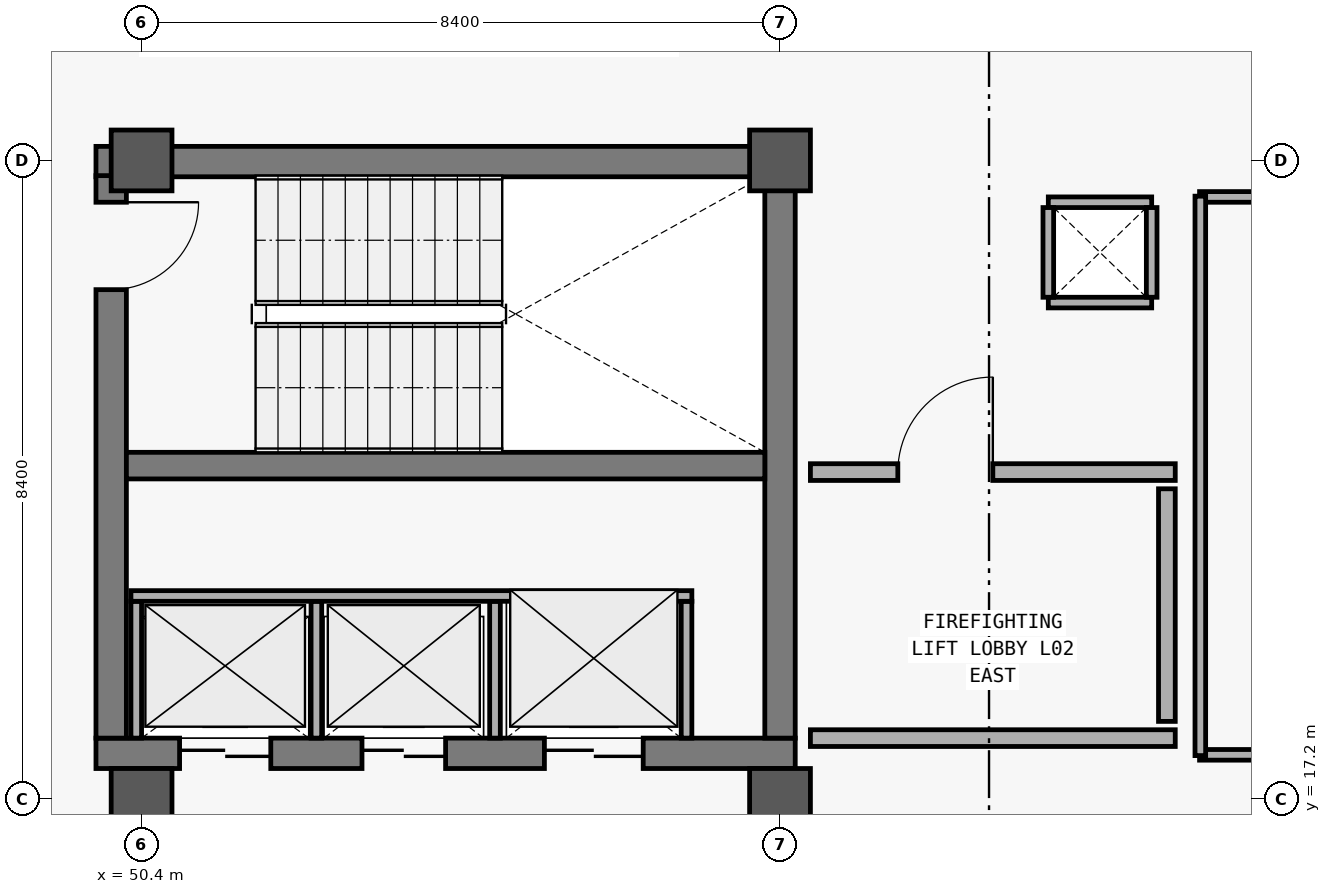
"""IFC4 building model, lengths in metres.
Left out: names, types, materials, properties, quantities, classifications, styles, units other than length and angle.
Written with IfcOpenShell. Run it as: python <this file> out.ifc"""

import sys

from ifc_helpers import new_model, si_unit, direction, frame, frame_2d, origin, origin_2d, place, context, subcontext, project, spatial, rectangle, extrude, element, fill, save


model = new_model("IFC4")
c1 = context("Model", 3, precision=1e-05, world=origin(), true_north=direction((0.0, 1.0)))
c2 = subcontext(c1, "Body", "Model", "MODEL_VIEW")
j1 = project(units=[si_unit("LENGTHUNIT", "METRE"), si_unit("PLANEANGLEUNIT", "RADIAN")], contexts=[c1])
p1 = place(None, origin())
s1 = spatial("IfcSite", under=j1, at=p1, CompositionType="ELEMENT")
p2 = place(p1, origin())
s2 = spatial("IfcBuilding", under=s1, at=p2, CompositionType="ELEMENT")
p3 = place(p2, frame((0.0, 0.0, 10.8)))
s3 = spatial("IfcBuildingStorey", under=s2, at=p3, CompositionType="ELEMENT", Elevation=10.8)
for number, where, z_axis, x_axis in (
    (1, (50.4, 17.2, 0.0), (0.0, 0.0, 1.0), (1.0, 0.0, 0.0)),
    (2, (50.4, 25.6, 0.0), (0.0, 0.0, 1.0), (1.0, 0.0, 0.0)),
    (3, (58.8, 17.2, 0.0), (0.0, 0.0, 1.0), (1.0, 0.0, 0.0)),
    (4, (58.8, 25.6, 0.0), (0.0, 0.0, 1.0), (1.0, 0.0, 0.0)),
):
    element("IfcColumn", number, at=place(p3, frame(where, z_axis=z_axis, x_axis=x_axis)), inside=s3, PredefinedType="COLUMN", context=c2, shape_type="SweptSolid", body=[
        extrude(rectangle(XDim=0.8, YDim=0.8, at=origin_2d()), origin(), (0.0, 0.0, 1.0), 4.2),
    ])
p4 = place(p3, frame((49.8, 17.8, 0.0), z_axis=(0.0, 0.0, 1.0), x_axis=(1.0, 0.0, 0.0)))
e5 = element("IfcWall", 5, at=p4, inside=s3, PredefinedType="SHEAR", context=c2, shape_type="SweptSolid", body=[
    extrude(rectangle(XDim=9.2, YDim=0.4, at=frame_2d((4.6, 0.0))), origin(), (0.0, 0.0, 1.0), 3.92),
])
p5 = place(p4, frame((1.1, 0.0, 0.0)))
e6 = element("IfcOpeningElement", 6, at=p5, cuts=e5, PredefinedType="OPENING", context=c2, shape_type="SweptSolid", body=[
    extrude(rectangle(XDim=1.2, YDim=2.2, at=frame_2d((0.6, 1.1))), frame((0.0, 0.21, 0.0), z_axis=(0.0, -1.0, 0.0), x_axis=(1.0, 0.0, 0.0)), (0.0, 0.0, 1.0), 0.42),
])
p6 = place(p4, frame((3.5, 0.0, 0.0)))
e7 = element("IfcOpeningElement", 7, at=p6, cuts=e5, PredefinedType="OPENING", context=c2, shape_type="SweptSolid", body=[
    extrude(rectangle(XDim=1.1, YDim=2.2, at=frame_2d((0.55, 1.1))), frame((0.0, 0.21, 0.0), z_axis=(0.0, -1.0, 0.0), x_axis=(1.0, 0.0, 0.0)), (0.0, 0.0, 1.0), 0.42),
])
p7 = place(p4, frame((5.9, 0.0, 0.0)))
e8 = element("IfcOpeningElement", 8, at=p7, cuts=e5, PredefinedType="OPENING", context=c2, shape_type="SweptSolid", body=[
    extrude(rectangle(XDim=1.3, YDim=2.3, at=frame_2d((0.65, 1.15))), frame((0.0, 0.21, 0.0), z_axis=(0.0, -1.0, 0.0), x_axis=(1.0, 0.0, 0.0)), (0.0, 0.0, 1.0), 0.42),
])
p8 = place(p3, frame((59.0, 25.585, 0.0), z_axis=(0.0, 0.0, 1.0), x_axis=(-1.0, 0.0, 0.0)))
e9 = element("IfcWall", 9, at=p8, inside=s3, PredefinedType="SHEAR", context=c2, shape_type="SweptSolid", body=[
    extrude(rectangle(XDim=9.2, YDim=0.4, at=frame_2d((4.6, 0.0))), origin(), (0.0, 0.0, 1.0), 3.92),
])
p9 = place(p3, frame((50.0, 25.4, 0.0), z_axis=(0.0, 0.0, 1.0), x_axis=(0.0, -1.0, 0.0)))
e10 = element("IfcWall", 10, at=p9, inside=s3, PredefinedType="SHEAR", context=c2, shape_type="SweptSolid", body=[
    extrude(rectangle(XDim=7.4, YDim=0.4, at=frame_2d((3.7, 0.0))), origin(), (0.0, 0.0, 1.0), 3.92),
])
p10 = place(p9, frame((0.35, 0.0, 0.0)))
e11 = element("IfcOpeningElement", 11, at=p10, cuts=e10, PredefinedType="OPENING", context=c2, shape_type="SweptSolid", body=[
    extrude(rectangle(XDim=1.15, YDim=2.2, at=frame_2d((0.575, 1.1))), frame((0.0, 0.21, 0.0), z_axis=(0.0, -1.0, 0.0), x_axis=(1.0, 0.0, 0.0)), (0.0, 0.0, 1.0), 0.42),
])
p11 = place(p3, frame((58.8, 18.0, 0.0), z_axis=(0.0, 0.0, 1.0), x_axis=(0.0, 1.0, 0.0)))
e12 = element("IfcWall", 12, at=p11, inside=s3, PredefinedType="SHEAR", context=c2, shape_type="SweptSolid", body=[
    extrude(rectangle(XDim=7.4, YDim=0.4, at=frame_2d((3.7, 0.0))), origin(), (0.0, 0.0, 1.0), 3.92),
])
p12 = place(p3, frame((50.2, 21.585, 0.0), z_axis=(0.0, 0.0, 1.0), x_axis=(1.0, 0.0, 0.0)))
e13 = element("IfcWall", 13, at=p12, inside=s3, PredefinedType="SHEAR", context=c2, shape_type="SweptSolid", body=[
    extrude(rectangle(XDim=8.4, YDim=0.35, at=frame_2d((4.2, 0.0))), origin(), (0.0, 0.0, 1.0), 3.92),
])
for number, where, z_axis, x_axis in (
    (14, (50.33, 18.0, 0.0), (0.0, 0.0, 1.0), (0.0, 1.0, 0.0)),
    (15, (52.7, 18.0, 0.0), (0.0, 0.0, 1.0), (0.0, 1.0, 0.0)),
    (16, (55.05, 18.0, 0.0), (0.0, 0.0, 1.0), (0.0, 1.0, 0.0)),
    (17, (57.57, 18.0, 0.0), (0.0, 0.0, 1.0), (0.0, 1.0, 0.0)),
):
    element("IfcWall", number, at=place(p3, frame(where, z_axis=z_axis, x_axis=x_axis)), inside=s3, PredefinedType="PARTITIONING", context=c2, shape_type="SweptSolid", body=[
        extrude(rectangle(XDim=1.8, YDim=0.14, at=frame_2d((0.9, 0.0))), origin(), (0.0, 0.0, 1.0), 3.07),
    ])
p13 = place(p3, frame((50.26, 19.87, 0.0), z_axis=(0.0, 0.0, 1.0), x_axis=(1.0, 0.0, 0.0)))
e18 = element("IfcWall", 18, at=p13, inside=s3, PredefinedType="PARTITIONING", context=c2, shape_type="SweptSolid", body=[
    extrude(rectangle(XDim=7.38, YDim=0.14, at=frame_2d((3.69, 0.0))), origin(), (0.0, 0.0, 1.0), 3.07),
])
p14 = place(p3, frame((59.2, 18.0, 0.0), z_axis=(0.0, 0.0, 1.0), x_axis=(1.0, 0.0, 0.0)))
e19 = element("IfcWall", 19, at=p14, inside=s3, PredefinedType="SOLIDWALL", context=c2, shape_type="SweptSolid", body=[
    extrude(rectangle(XDim=4.8, YDim=0.22, at=frame_2d((2.4, 0.0))), origin(), (0.0, 0.0, 1.0), 3.07),
])
p15 = place(p3, frame((59.2, 21.5, 0.0), z_axis=(0.0, 0.0, 1.0), x_axis=(1.0, 0.0, 0.0)))
e20 = element("IfcWall", 20, at=p15, inside=s3, PredefinedType="SOLIDWALL", context=c2, shape_type="SweptSolid", body=[
    extrude(rectangle(XDim=4.8, YDim=0.22, at=frame_2d((2.4, 0.0))), origin(), (0.0, 0.0, 1.0), 3.07),
])
p16 = place(p15, frame((1.15, 0.0, 0.0)))
e21 = element("IfcOpeningElement", 21, at=p16, cuts=e20, PredefinedType="OPENING", context=c2, shape_type="SweptSolid", body=[
    extrude(rectangle(XDim=1.25, YDim=2.2, at=frame_2d((0.625, 1.1))), frame((0.0, 0.12, 0.0), z_axis=(0.0, -1.0, 0.0), x_axis=(1.0, 0.0, 0.0)), (0.0, 0.0, 1.0), 0.24),
])
p17 = place(p3, frame((63.89, 18.22, 0.0), z_axis=(0.0, 0.0, 1.0), x_axis=(0.0, 1.0, 0.0)))
e22 = element("IfcWall", 22, at=p17, inside=s3, PredefinedType="SOLIDWALL", context=c2, shape_type="SweptSolid", body=[
    extrude(rectangle(XDim=3.06, YDim=0.22, at=frame_2d((1.53, 0.0))), origin(), (0.0, 0.0, 1.0), 3.07),
])
p18 = place(p3, frame((64.32, 17.78, 0.0), z_axis=(0.0, 0.0, 1.0), x_axis=(1.0, 0.0, 0.0)))
e23 = element("IfcWall", 23, at=p18, inside=s3, PredefinedType="PARTITIONING", context=c2, shape_type="SweptSolid", body=[
    extrude(rectangle(XDim=27.8, YDim=0.14, at=frame_2d((13.9, 0.0))), origin(), (0.0, 0.0, 1.0), 3.02),
])
p19 = place(p18, frame((5.958, 0.0, 0.0)))
e24 = element("IfcOpeningElement", 24, at=p19, cuts=e23, PredefinedType="OPENING", context=c2, shape_type="SweptSolid", body=[
    extrude(rectangle(XDim=1.08, YDim=2.25, at=frame_2d((0.54, 1.125))), frame((0.0, 0.08, 0.0), z_axis=(0.0, -1.0, 0.0), x_axis=(1.0, 0.0, 0.0)), (0.0, 0.0, 1.0), 0.16),
])
p20 = place(p3, frame((64.32, 25.12, 0.0), z_axis=(0.0, 0.0, 1.0), x_axis=(1.0, 0.0, 0.0)))
e25 = element("IfcWall", 25, at=p20, inside=s3, PredefinedType="PARTITIONING", context=c2, shape_type="SweptSolid", body=[
    extrude(rectangle(XDim=27.8, YDim=0.14, at=frame_2d((13.9, 0.0))), origin(), (0.0, 0.0, 1.0), 3.02),
])
p21 = place(p3, frame((64.33, 17.77, 0.0), z_axis=(0.0, 0.0, 1.0), x_axis=(0.0, 1.0, 0.0)))
e26 = element("IfcWall", 26, at=p21, inside=s3, PredefinedType="PARTITIONING", context=c2, shape_type="SweptSolid", body=[
    extrude(rectangle(XDim=7.36, YDim=0.14, at=frame_2d((3.68, 0.0))), origin(), (0.0, 0.0, 1.0), 3.02),
])
for number, where, z_axis, x_axis in (
    (27, (62.33, 23.73, 0.0), (0.0, 0.0, 1.0), (1.0, 0.0, 0.0)),
    (28, (63.69, 25.05, 0.0), (0.0, 0.0, 1.0), (-1.0, 0.0, 0.0)),
):
    element("IfcWall", number, at=place(p3, frame(where, z_axis=z_axis, x_axis=x_axis)), inside=s3, PredefinedType="PARTITIONING", context=c2, shape_type="SweptSolid", body=[
        extrude(rectangle(XDim=1.36, YDim=0.14, at=frame_2d((0.68, 0.0))), origin(), (0.0, 0.0, 1.0), 3.04),
    ])
for number, where, z_axis, x_axis in (
    (29, (62.33, 24.98, 0.0), (0.0, 0.0, 1.0), (0.0, -1.0, 0.0)),
    (30, (63.69, 23.8, 0.0), (0.0, 0.0, 1.0), (0.0, 1.0, 0.0)),
):
    element("IfcWall", number, at=place(p3, frame(where, z_axis=z_axis, x_axis=x_axis)), inside=s3, PredefinedType="PARTITIONING", context=c2, shape_type="SweptSolid", body=[
        extrude(rectangle(XDim=1.18, YDim=0.14, at=frame_2d((0.59, 0.0))), origin(), (0.0, 0.0, 1.0), 3.04),
    ])
p22 = place(p10, origin())
e31 = element("IfcDoor", 31, at=p22, inside=s3, OperationType="SINGLE_SWING_LEFT", PredefinedType="DOOR", context=c2, shape_type="SweptSolid", body=[
    extrude(rectangle(XDim=1.15, YDim=2.2, at=frame_2d((0.575, 1.1))), frame((0.0, 0.025, 0.0), z_axis=(0.0, -1.0, 0.0), x_axis=(1.0, 0.0, 0.0)), (0.0, 0.0, 1.0), 0.05),
])
fill(e11, e31)
p23 = place(p5, origin())
e32 = element("IfcDoor", 32, at=p23, inside=s3, OperationType="DOUBLE_DOOR_SLIDING", PredefinedType="DOOR", context=c2, shape_type="SweptSolid", body=[
    extrude(rectangle(XDim=1.2, YDim=2.2, at=frame_2d((0.6, 1.1))), frame((0.0, 0.025, 0.0), z_axis=(0.0, -1.0, 0.0), x_axis=(1.0, 0.0, 0.0)), (0.0, 0.0, 1.0), 0.05),
])
fill(e6, e32)
p24 = place(p6, origin())
e33 = element("IfcDoor", 33, at=p24, inside=s3, OperationType="DOUBLE_DOOR_SLIDING", PredefinedType="DOOR", context=c2, shape_type="SweptSolid", body=[
    extrude(rectangle(XDim=1.1, YDim=2.2, at=frame_2d((0.55, 1.1))), frame((0.0, 0.025, 0.0), z_axis=(0.0, -1.0, 0.0), x_axis=(1.0, 0.0, 0.0)), (0.0, 0.0, 1.0), 0.05),
])
fill(e7, e33)
p25 = place(p7, origin())
e34 = element("IfcDoor", 34, at=p25, inside=s3, OperationType="DOUBLE_DOOR_SLIDING", PredefinedType="DOOR", context=c2, shape_type="SweptSolid", body=[
    extrude(rectangle(XDim=1.3, YDim=2.3, at=frame_2d((0.65, 1.15))), frame((0.0, 0.025, 0.0), z_axis=(0.0, -1.0, 0.0), x_axis=(1.0, 0.0, 0.0)), (0.0, 0.0, 1.0), 0.05),
])
fill(e8, e34)
p26 = place(p16, origin())
e35 = element("IfcDoor", 35, at=p26, inside=s3, OperationType="SINGLE_SWING_RIGHT", PredefinedType="DOOR", context=c2, shape_type="SweptSolid", body=[
    extrude(rectangle(XDim=1.25, YDim=2.2, at=frame_2d((0.625, 1.1))), frame((0.0, 0.025, 0.0), z_axis=(0.0, -1.0, 0.0), x_axis=(1.0, 0.0, 0.0)), (0.0, 0.0, 1.0), 0.05),
])
fill(e21, e35)
save(model, sys.argv[1])
